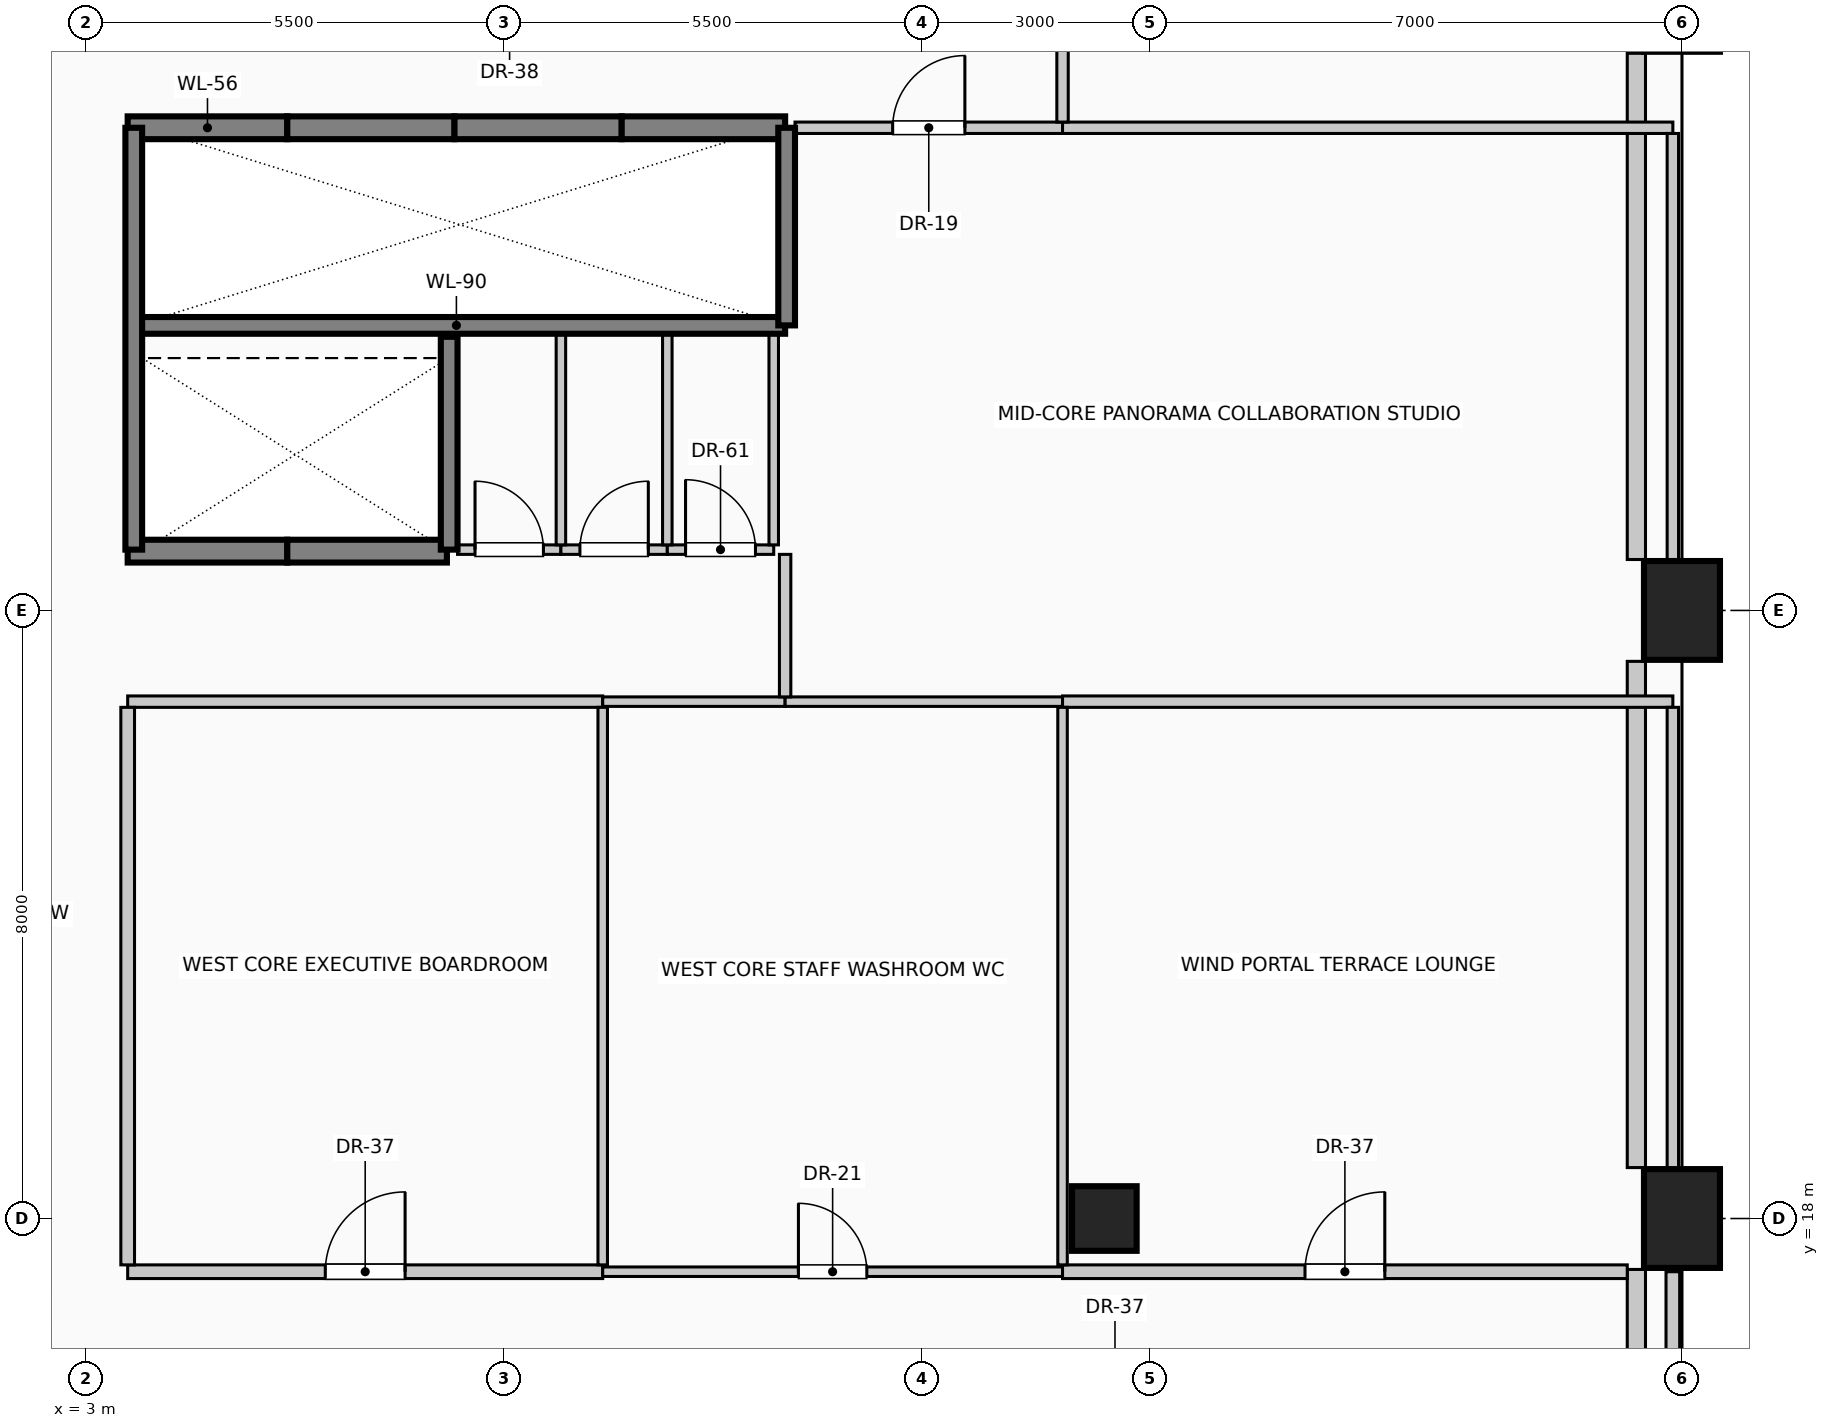
"""IFC4 building model, lengths in metres.
Left out: names, types, materials, properties, quantities, classifications, styles, units other than length and angle.
Written with IfcOpenShell. Run it as: python <this file> out.ifc"""

import sys

from ifc_helpers import new_model, si_unit, direction, frame, frame_2d, origin, origin_2d, place, context, subcontext, project, spatial, rectangle, circle, extrude, element, fill, save


model = new_model("IFC4")
c1 = context("Model", 3, precision=1e-05, world=origin(), true_north=direction((0.0, 1.0)))
c2 = subcontext(c1, "Body", "Model", "MODEL_VIEW")
j1 = project(units=[si_unit("LENGTHUNIT", "METRE"), si_unit("PLANEANGLEUNIT", "RADIAN")], contexts=[c1])
p1 = place(None, origin())
s1 = spatial("IfcSite", under=j1, at=p1, CompositionType="ELEMENT")
p2 = place(p1, origin())
s2 = spatial("IfcBuilding", under=s1, at=p2, CompositionType="ELEMENT")
p3 = place(p2, frame((0.0, 0.0, 186.6)))
s3 = spatial("IfcBuildingStorey", under=s2, at=p3, CompositionType="ELEMENT", Elevation=186.6)
for number, where, z_axis, x_axis in (
    (1, (24.0, 18.0, 0.0), (0.0, 0.0, 1.0), (1.0, 0.0, 0.0)),
    (2, (24.0, 26.0, 0.0), (0.0, 0.0, 1.0), (1.0, 0.0, 0.0)),
    (3, (24.0, 34.0, 0.0), (0.0, 0.0, 1.0), (1.0, 0.0, 0.0)),
):
    element("IfcColumn", number, at=place(p3, frame(where, z_axis=z_axis, x_axis=x_axis)), inside=s3, PredefinedType="COLUMN", context=c2, shape_type="SweptSolid", body=[
        extrude(rectangle(XDim=1.0, YDim=1.3, at=origin_2d()), origin(), (0.0, 0.0, 1.0), 4.0),
    ])
p4 = place(p3, frame((16.4, 18.0, 0.0), z_axis=(0.0, 0.0, 1.0), x_axis=(1.0, 0.0, 0.0)))
e4 = element("IfcColumn", 4, at=p4, inside=s3, PredefinedType="COLUMN", context=c2, shape_type="SweptSolid", body=[
    extrude(circle(Radius=0.425, at=origin_2d()), origin(), (0.0, 0.0, 1.0), 4.0),
])
p5 = place(p3, frame((23.4, 17.33, 0.0), z_axis=(0.0, 0.0, 1.0), x_axis=(0.0, -1.0, 0.0)))
e5 = element("IfcWall", 5, at=p5, inside=s3, PredefinedType="SOLIDWALL", context=c2, shape_type="SweptSolid", body=[
    extrude(rectangle(XDim=6.66, YDim=0.24, at=frame_2d((3.33, 0.0))), origin(), (0.0, 0.0, 1.0), 3.75),
])
p6 = place(p5, frame((3.707, 0.0, 0.42)))
e6 = element("IfcOpeningElement", 6, at=p6, cuts=e5, PredefinedType="OPENING", context=c2, shape_type="SweptSolid", body=[
    extrude(rectangle(XDim=2.2, YDim=1.95, at=frame_2d((1.1, 0.975))), frame((0.0, 0.13, 0.0), z_axis=(0.0, -1.0, 0.0), x_axis=(1.0, 0.0, 0.0)), (0.0, 0.0, 1.0), 0.26),
])
for number, where, z_axis, x_axis in (
    (7, (23.4, 25.33, 0.0), (0.0, 0.0, 1.0), (0.0, -1.0, 0.0)),
    (8, (23.4, 33.33, 0.0), (0.0, 0.0, 1.0), (0.0, -1.0, 0.0)),
):
    element("IfcWall", number, at=place(p3, frame(where, z_axis=z_axis, x_axis=x_axis)), inside=s3, PredefinedType="SOLIDWALL", context=c2, shape_type="SweptSolid", body=[
        extrude(rectangle(XDim=6.66, YDim=0.24, at=frame_2d((3.33, 0.0))), origin(), (0.0, 0.0, 1.0), 3.75),
    ])
p7 = place(p3, frame((3.55, 32.35, 0.0), z_axis=(0.0, 0.0, 1.0), x_axis=(1.0, 0.0, 0.0)))
e9 = element("IfcWall", 9, at=p7, inside=s3, PredefinedType="SOLIDWALL", context=c2, shape_type="SweptSolid", body=[
    extrude(rectangle(XDim=2.1, YDim=0.3, at=frame_2d((1.05, 0.0))), origin(), (0.0, 0.0, 1.0), 4.0),
])
p8 = place(p3, frame((5.65, 32.35, 0.0), z_axis=(0.0, 0.0, 1.0), x_axis=(1.0, 0.0, 0.0)))
e10 = element("IfcWall", 10, at=p8, inside=s3, PredefinedType="SOLIDWALL", context=c2, shape_type="SweptSolid", body=[
    extrude(rectangle(XDim=2.2, YDim=0.3, at=frame_2d((1.1, 0.0))), origin(), (0.0, 0.0, 1.0), 4.0),
])
p9 = place(p3, frame((7.85, 32.35, 0.0), z_axis=(0.0, 0.0, 1.0), x_axis=(1.0, 0.0, 0.0)))
e11 = element("IfcWall", 11, at=p9, inside=s3, PredefinedType="SOLIDWALL", context=c2, shape_type="SweptSolid", body=[
    extrude(rectangle(XDim=2.2, YDim=0.3, at=frame_2d((1.1, 0.0))), origin(), (0.0, 0.0, 1.0), 4.0),
])
p10 = place(p3, frame((10.05, 32.35, 0.0), z_axis=(0.0, 0.0, 1.0), x_axis=(1.0, 0.0, 0.0)))
e12 = element("IfcWall", 12, at=p10, inside=s3, PredefinedType="SOLIDWALL", context=c2, shape_type="SweptSolid", body=[
    extrude(rectangle(XDim=2.15, YDim=0.3, at=frame_2d((1.075, 0.0))), origin(), (0.0, 0.0, 1.0), 4.0),
])
p11 = place(p3, frame((5.65, 26.78, 0.0), z_axis=(0.0, 0.0, 1.0), x_axis=(-1.0, 0.0, 0.0)))
e13 = element("IfcWall", 13, at=p11, inside=s3, PredefinedType="SOLIDWALL", context=c2, shape_type="SweptSolid", body=[
    extrude(rectangle(XDim=2.1, YDim=0.3, at=frame_2d((1.05, 0.0))), origin(), (0.0, 0.0, 1.0), 4.0),
])
p12 = place(p3, frame((7.75, 26.78, 0.0), z_axis=(0.0, 0.0, 1.0), x_axis=(-1.0, 0.0, 0.0)))
e14 = element("IfcWall", 14, at=p12, inside=s3, PredefinedType="SOLIDWALL", context=c2, shape_type="SweptSolid", body=[
    extrude(rectangle(XDim=2.1, YDim=0.3, at=frame_2d((1.05, 0.0))), origin(), (0.0, 0.0, 1.0), 4.0),
])
p13 = place(p3, frame((3.55, 29.75, 0.0), z_axis=(0.0, 0.0, 1.0), x_axis=(1.0, 0.0, 0.0)))
e15 = element("IfcWall", 15, at=p13, inside=s3, PredefinedType="SOLIDWALL", context=c2, shape_type="SweptSolid", body=[
    extrude(rectangle(XDim=8.65, YDim=0.22, at=frame_2d((4.325, 0.0))), origin(), (0.0, 0.0, 1.0), 4.0),
])
p14 = place(p3, frame((3.63, 26.8, 0.0), z_axis=(0.0, 0.0, 1.0), x_axis=(0.0, 1.0, 0.0)))
e16 = element("IfcWall", 16, at=p14, inside=s3, PredefinedType="SOLIDWALL", context=c2, shape_type="SweptSolid", body=[
    extrude(rectangle(XDim=5.55, YDim=0.22, at=frame_2d((2.775, 0.0))), origin(), (0.0, 0.0, 1.0), 4.0),
])
p15 = place(p3, frame((7.78, 26.8, 0.0), z_axis=(0.0, 0.0, 1.0), x_axis=(0.0, 1.0, 0.0)))
e17 = element("IfcWall", 17, at=p15, inside=s3, PredefinedType="SOLIDWALL", context=c2, shape_type="SweptSolid", body=[
    extrude(rectangle(XDim=2.8, YDim=0.22, at=frame_2d((1.4, 0.0))), origin(), (0.0, 0.0, 1.0), 4.0),
])
p16 = place(p3, frame((12.22, 29.75, 0.0), z_axis=(0.0, 0.0, 1.0), x_axis=(0.0, 1.0, 0.0)))
e18 = element("IfcWall", 18, at=p16, inside=s3, PredefinedType="SOLIDWALL", context=c2, shape_type="SweptSolid", body=[
    extrude(rectangle(XDim=2.6, YDim=0.22, at=frame_2d((1.3, 0.0))), origin(), (0.0, 0.0, 1.0), 4.0),
])
p17 = place(p3, frame((3.55, 17.3, 0.0), z_axis=(0.0, 0.0, 1.0), x_axis=(1.0, 0.0, 0.0)))
e19 = element("IfcWall", 19, at=p17, inside=s3, PredefinedType="PARTITIONING", context=c2, shape_type="SweptSolid", body=[
    extrude(rectangle(XDim=6.25, YDim=0.18, at=frame_2d((3.125, 0.0))), origin(), (0.0, 0.0, 1.0), 3.75),
])
p18 = place(p17, frame((2.6, 0.0, 0.0)))
e20 = element("IfcOpeningElement", 20, at=p18, cuts=e19, PredefinedType="OPENING", context=c2, shape_type="SweptSolid", body=[
    extrude(rectangle(XDim=1.05, YDim=2.15, at=frame_2d((0.525, 1.075))), frame((0.0, 0.1, 0.0), z_axis=(0.0, -1.0, 0.0), x_axis=(1.0, 0.0, 0.0)), (0.0, 0.0, 1.0), 0.2),
])
p19 = place(p3, frame((9.8, 17.3, 0.0), z_axis=(0.0, 0.0, 1.0), x_axis=(1.0, 0.0, 0.0)))
e21 = element("IfcWall", 21, at=p19, inside=s3, PredefinedType="PARTITIONING", context=c2, shape_type="SweptSolid", body=[
    extrude(rectangle(XDim=6.05, YDim=0.125, at=frame_2d((3.025, 0.0))), origin(), (0.0, 0.0, 1.0), 3.75),
])
p20 = place(p19, frame((2.575, 0.0, 0.0)))
e22 = element("IfcOpeningElement", 22, at=p20, cuts=e21, PredefinedType="OPENING", context=c2, shape_type="SweptSolid", body=[
    extrude(rectangle(XDim=0.9, YDim=2.1, at=frame_2d((0.45, 1.05))), frame((0.0, 0.073, 0.0), z_axis=(0.0, -1.0, 0.0), x_axis=(1.0, 0.0, 0.0)), (0.0, 0.0, 1.0), 0.145),
])
p21 = place(p3, frame((15.85, 17.3, 0.0), z_axis=(0.0, 0.0, 1.0), x_axis=(1.0, 0.0, 0.0)))
e23 = element("IfcWall", 23, at=p21, inside=s3, PredefinedType="PARTITIONING", context=c2, shape_type="SweptSolid", body=[
    extrude(rectangle(XDim=7.43, YDim=0.18, at=frame_2d((3.715, 0.0))), origin(), (0.0, 0.0, 1.0), 3.75),
])
p22 = place(p21, frame((3.19, 0.0, 0.0)))
e24 = element("IfcOpeningElement", 24, at=p22, cuts=e23, PredefinedType="OPENING", context=c2, shape_type="SweptSolid", body=[
    extrude(rectangle(XDim=1.05, YDim=2.15, at=frame_2d((0.525, 1.075))), frame((0.0, 0.1, 0.0), z_axis=(0.0, -1.0, 0.0), x_axis=(1.0, 0.0, 0.0)), (0.0, 0.0, 1.0), 0.2),
])
p23 = place(p3, frame((3.55, 24.8, 0.0), z_axis=(0.0, 0.0, 1.0), x_axis=(1.0, 0.0, 0.0)))
e25 = element("IfcWall", 25, at=p23, inside=s3, PredefinedType="PARTITIONING", context=c2, shape_type="SweptSolid", body=[
    extrude(rectangle(XDim=6.25, YDim=0.15, at=frame_2d((3.125, 0.0))), origin(), (0.0, 0.0, 1.0), 3.75),
])
p24 = place(p3, frame((9.8, 24.8, 0.0), z_axis=(0.0, 0.0, 1.0), x_axis=(1.0, 0.0, 0.0)))
e26 = element("IfcWall", 26, at=p24, inside=s3, PredefinedType="PARTITIONING", context=c2, shape_type="SweptSolid", body=[
    extrude(rectangle(XDim=2.4, YDim=0.125, at=frame_2d((1.2, 0.0))), origin(), (0.0, 0.0, 1.0), 3.75),
])
p25 = place(p3, frame((12.2, 24.8, 0.0), z_axis=(0.0, 0.0, 1.0), x_axis=(1.0, 0.0, 0.0)))
e27 = element("IfcWall", 27, at=p25, inside=s3, PredefinedType="PARTITIONING", context=c2, shape_type="SweptSolid", body=[
    extrude(rectangle(XDim=3.65, YDim=0.125, at=frame_2d((1.825, 0.0))), origin(), (0.0, 0.0, 1.0), 3.75),
])
p26 = place(p3, frame((15.85, 24.8, 0.0), z_axis=(0.0, 0.0, 1.0), x_axis=(1.0, 0.0, 0.0)))
e28 = element("IfcWall", 28, at=p26, inside=s3, PredefinedType="PARTITIONING", context=c2, shape_type="SweptSolid", body=[
    extrude(rectangle(XDim=8.03, YDim=0.15, at=frame_2d((4.015, 0.0))), origin(), (0.0, 0.0, 1.0), 3.75),
])
p27 = place(p3, frame((7.89, 26.8, 0.0), z_axis=(0.0, 0.0, 1.0), x_axis=(1.0, 0.0, 0.0)))
e29 = element("IfcWall", 29, at=p27, inside=s3, PredefinedType="PARTITIONING", context=c2, shape_type="SweptSolid", body=[
    extrude(rectangle(XDim=1.36, YDim=0.125, at=frame_2d((0.68, 0.0))), origin(), (0.0, 0.0, 1.0), 3.75),
])
p28 = place(p27, frame((0.23, 0.0, 0.0)))
e30 = element("IfcOpeningElement", 30, at=p28, cuts=e29, PredefinedType="OPENING", context=c2, shape_type="SweptSolid", body=[
    extrude(rectangle(XDim=0.9, YDim=2.1, at=frame_2d((0.45, 1.05))), frame((0.0, 0.073, 0.0), z_axis=(0.0, -1.0, 0.0), x_axis=(1.0, 0.0, 0.0)), (0.0, 0.0, 1.0), 0.145),
])
p29 = place(p3, frame((9.25, 26.8, 0.0), z_axis=(0.0, 0.0, 1.0), x_axis=(1.0, 0.0, 0.0)))
e31 = element("IfcWall", 31, at=p29, inside=s3, PredefinedType="PARTITIONING", context=c2, shape_type="SweptSolid", body=[
    extrude(rectangle(XDim=1.4, YDim=0.125, at=frame_2d((0.7, 0.0))), origin(), (0.0, 0.0, 1.0), 3.75),
])
p30 = place(p29, frame((0.25, 0.0, 0.0)))
e32 = element("IfcOpeningElement", 32, at=p30, cuts=e31, PredefinedType="OPENING", context=c2, shape_type="SweptSolid", body=[
    extrude(rectangle(XDim=0.9, YDim=2.1, at=frame_2d((0.45, 1.05))), frame((0.0, 0.073, 0.0), z_axis=(0.0, -1.0, 0.0), x_axis=(1.0, 0.0, 0.0)), (0.0, 0.0, 1.0), 0.145),
])
p31 = place(p3, frame((10.65, 26.8, 0.0), z_axis=(0.0, 0.0, 1.0), x_axis=(1.0, 0.0, 0.0)))
e33 = element("IfcWall", 33, at=p31, inside=s3, PredefinedType="PARTITIONING", context=c2, shape_type="SweptSolid", body=[
    extrude(rectangle(XDim=1.4, YDim=0.125, at=frame_2d((0.7, 0.0))), origin(), (0.0, 0.0, 1.0), 3.75),
])
p32 = place(p31, frame((0.24, 0.0, 0.0)))
e34 = element("IfcOpeningElement", 34, at=p32, cuts=e33, PredefinedType="OPENING", context=c2, shape_type="SweptSolid", body=[
    extrude(rectangle(XDim=0.92, YDim=2.1, at=frame_2d((0.46, 1.05))), frame((0.0, 0.073, 0.0), z_axis=(0.0, -1.0, 0.0), x_axis=(1.0, 0.0, 0.0)), (0.0, 0.0, 1.0), 0.145),
])
p33 = place(p3, frame((12.33, 32.35, 0.0), z_axis=(0.0, 0.0, 1.0), x_axis=(1.0, 0.0, 0.0)))
e35 = element("IfcWall", 35, at=p33, inside=s3, PredefinedType="PARTITIONING", context=c2, shape_type="SweptSolid", body=[
    extrude(rectangle(XDim=3.52, YDim=0.15, at=frame_2d((1.76, 0.0))), origin(), (0.0, 0.0, 1.0), 3.75),
])
p34 = place(p33, frame((1.285, 0.0, 0.0)))
e36 = element("IfcOpeningElement", 36, at=p34, cuts=e35, PredefinedType="OPENING", context=c2, shape_type="SweptSolid", body=[
    extrude(rectangle(XDim=0.95, YDim=2.15, at=frame_2d((0.475, 1.075))), frame((0.0, 0.085, 0.0), z_axis=(0.0, -1.0, 0.0), x_axis=(1.0, 0.0, 0.0)), (0.0, 0.0, 1.0), 0.17),
])
p35 = place(p3, frame((15.85, 32.35, 0.0), z_axis=(0.0, 0.0, 1.0), x_axis=(1.0, 0.0, 0.0)))
e37 = element("IfcWall", 37, at=p35, inside=s3, PredefinedType="PARTITIONING", context=c2, shape_type="SweptSolid", body=[
    extrude(rectangle(XDim=8.03, YDim=0.15, at=frame_2d((4.015, 0.0))), origin(), (0.0, 0.0, 1.0), 3.75),
])
p36 = place(p3, frame((3.55, 17.39, 0.0), z_axis=(0.0, 0.0, 1.0), x_axis=(0.0, 1.0, 0.0)))
e38 = element("IfcWall", 38, at=p36, inside=s3, PredefinedType="PARTITIONING", context=c2, shape_type="SweptSolid", body=[
    extrude(rectangle(XDim=7.335, YDim=0.18, at=frame_2d((3.667, 0.0))), origin(), (0.0, 0.0, 1.0), 3.75),
])
p37 = place(p3, frame((9.25, 26.863, 0.0), z_axis=(0.0, 0.0, 1.0), x_axis=(0.0, 1.0, 0.0)))
e39 = element("IfcWall", 39, at=p37, inside=s3, PredefinedType="PARTITIONING", context=c2, shape_type="SweptSolid", body=[
    extrude(rectangle(XDim=2.777, YDim=0.125, at=frame_2d((1.389, 0.0))), origin(), (0.0, 0.0, 1.0), 3.75),
])
p38 = place(p3, frame((9.8, 17.39, 0.0), z_axis=(0.0, 0.0, 1.0), x_axis=(0.0, 1.0, 0.0)))
e40 = element("IfcWall", 40, at=p38, inside=s3, PredefinedType="PARTITIONING", context=c2, shape_type="SweptSolid", body=[
    extrude(rectangle(XDim=7.335, YDim=0.125, at=frame_2d((3.667, 0.0))), origin(), (0.0, 0.0, 1.0), 3.75),
])
for number, where, z_axis, x_axis in (
    (41, (10.65, 26.863, 0.0), (0.0, 0.0, 1.0), (0.0, 1.0, 0.0)),
    (42, (12.05, 26.863, 0.0), (0.0, 0.0, 1.0), (0.0, 1.0, 0.0)),
):
    element("IfcWall", number, at=place(p3, frame(where, z_axis=z_axis, x_axis=x_axis)), inside=s3, PredefinedType="PARTITIONING", context=c2, shape_type="SweptSolid", body=[
        extrude(rectangle(XDim=2.777, YDim=0.125, at=frame_2d((1.389, 0.0))), origin(), (0.0, 0.0, 1.0), 3.75),
    ])
p39 = place(p3, frame((12.2, 24.863, 0.0), z_axis=(0.0, 0.0, 1.0), x_axis=(0.0, 1.0, 0.0)))
e43 = element("IfcWall", 43, at=p39, inside=s3, PredefinedType="PARTITIONING", context=c2, shape_type="SweptSolid", body=[
    extrude(rectangle(XDim=1.875, YDim=0.15, at=frame_2d((0.938, 0.0))), origin(), (0.0, 0.0, 1.0), 3.75),
])
p40 = place(p3, frame((15.85, 17.39, 0.0), z_axis=(0.0, 0.0, 1.0), x_axis=(0.0, 1.0, 0.0)))
e44 = element("IfcWall", 44, at=p40, inside=s3, PredefinedType="PARTITIONING", context=c2, shape_type="SweptSolid", body=[
    extrude(rectangle(XDim=7.335, YDim=0.125, at=frame_2d((3.667, 0.0))), origin(), (0.0, 0.0, 1.0), 3.75),
])
p41 = place(p3, frame((15.85, 32.425, 0.0), z_axis=(0.0, 0.0, 1.0), x_axis=(0.0, 1.0, 0.0)))
e45 = element("IfcWall", 45, at=p41, inside=s3, PredefinedType="PARTITIONING", context=c2, shape_type="SweptSolid", body=[
    extrude(rectangle(XDim=1.725, YDim=0.15, at=frame_2d((0.862, 0.0))), origin(), (0.0, 0.0, 1.0), 3.75),
])
p42 = place(p3, frame((23.88, 15.29, 0.0), z_axis=(0.0, 0.0, 1.0), x_axis=(0.0, 1.0, 0.0)))
e46 = element("IfcWall", 46, at=p42, inside=s3, PredefinedType="PARTITIONING", context=c2, shape_type="SweptSolid", body=[
    extrude(rectangle(XDim=2.01, YDim=0.18, at=frame_2d((1.005, 0.0))), origin(), (0.0, 0.0, 1.0), 3.145),
])
p43 = place(p3, frame((23.88, 18.65, 0.0), z_axis=(0.0, 0.0, 1.0), x_axis=(0.0, 1.0, 0.0)))
e47 = element("IfcWall", 47, at=p43, inside=s3, PredefinedType="PARTITIONING", context=c2, shape_type="SweptSolid", body=[
    extrude(rectangle(XDim=6.075, YDim=0.15, at=frame_2d((3.038, 0.0))), origin(), (0.0, 0.0, 1.0), 3.145),
])
p44 = place(p3, frame((23.88, 26.65, 0.0), z_axis=(0.0, 0.0, 1.0), x_axis=(0.0, 1.0, 0.0)))
e48 = element("IfcWall", 48, at=p44, inside=s3, PredefinedType="PARTITIONING", context=c2, shape_type="SweptSolid", body=[
    extrude(rectangle(XDim=5.625, YDim=0.15, at=frame_2d((2.812, 0.0))), origin(), (0.0, 0.0, 1.0), 3.145),
])
p45 = place(p18, origin())
e49 = element("IfcDoor", 49, at=p45, inside=s3, OperationType="SINGLE_SWING_RIGHT", PredefinedType="DOOR", context=c2, shape_type="SweptSolid", body=[
    extrude(rectangle(XDim=1.05, YDim=2.15, at=frame_2d((0.525, 1.075))), frame((0.0, 0.025, 0.0), z_axis=(0.0, -1.0, 0.0), x_axis=(1.0, 0.0, 0.0)), (0.0, 0.0, 1.0), 0.05),
])
fill(e20, e49)
p46 = place(p20, origin())
e50 = element("IfcDoor", 50, at=p46, inside=s3, OperationType="SINGLE_SWING_LEFT", PredefinedType="DOOR", context=c2, shape_type="SweptSolid", body=[
    extrude(rectangle(XDim=0.9, YDim=2.1, at=frame_2d((0.45, 1.05))), frame((0.0, 0.025, 0.0), z_axis=(0.0, -1.0, 0.0), x_axis=(1.0, 0.0, 0.0)), (0.0, 0.0, 1.0), 0.05),
])
fill(e22, e50)
p47 = place(p22, origin())
e51 = element("IfcDoor", 51, at=p47, inside=s3, OperationType="SINGLE_SWING_RIGHT", PredefinedType="DOOR", context=c2, shape_type="SweptSolid", body=[
    extrude(rectangle(XDim=1.05, YDim=2.15, at=frame_2d((0.525, 1.075))), frame((0.0, 0.025, 0.0), z_axis=(0.0, -1.0, 0.0), x_axis=(1.0, 0.0, 0.0)), (0.0, 0.0, 1.0), 0.05),
])
fill(e24, e51)
p48 = place(p28, origin())
e52 = element("IfcDoor", 52, at=p48, inside=s3, OperationType="SINGLE_SWING_LEFT", PredefinedType="DOOR", context=c2, shape_type="SweptSolid", body=[
    extrude(rectangle(XDim=0.9, YDim=2.1, at=frame_2d((0.45, 1.05))), frame((0.0, 0.025, 0.0), z_axis=(0.0, -1.0, 0.0), x_axis=(1.0, 0.0, 0.0)), (0.0, 0.0, 1.0), 0.05),
])
fill(e30, e52)
p49 = place(p30, origin())
e53 = element("IfcDoor", 53, at=p49, inside=s3, OperationType="SINGLE_SWING_RIGHT", PredefinedType="DOOR", context=c2, shape_type="SweptSolid", body=[
    extrude(rectangle(XDim=0.9, YDim=2.1, at=frame_2d((0.45, 1.05))), frame((0.0, 0.025, 0.0), z_axis=(0.0, -1.0, 0.0), x_axis=(1.0, 0.0, 0.0)), (0.0, 0.0, 1.0), 0.05),
])
fill(e32, e53)
p50 = place(p32, origin())
e54 = element("IfcDoor", 54, at=p50, inside=s3, OperationType="SINGLE_SWING_LEFT", PredefinedType="DOOR", context=c2, shape_type="SweptSolid", body=[
    extrude(rectangle(XDim=0.92, YDim=2.1, at=frame_2d((0.46, 1.05))), frame((0.0, 0.025, 0.0), z_axis=(0.0, -1.0, 0.0), x_axis=(1.0, 0.0, 0.0)), (0.0, 0.0, 1.0), 0.05),
])
fill(e34, e54)
p51 = place(p34, origin())
e55 = element("IfcDoor", 55, at=p51, inside=s3, OperationType="SINGLE_SWING_RIGHT", PredefinedType="DOOR", context=c2, shape_type="SweptSolid", body=[
    extrude(rectangle(XDim=0.95, YDim=2.15, at=frame_2d((0.475, 1.075))), frame((0.0, 0.025, 0.0), z_axis=(0.0, -1.0, 0.0), x_axis=(1.0, 0.0, 0.0)), (0.0, 0.0, 1.0), 0.05),
])
fill(e36, e55)
save(model, sys.argv[1])
